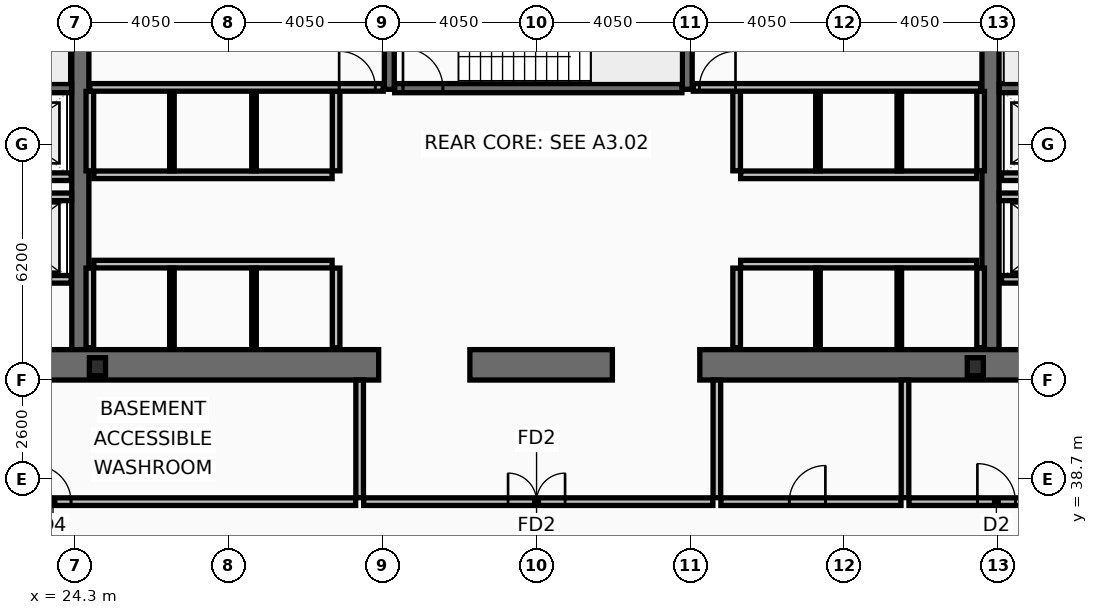
"""IFC4 building model, lengths in metres.
Left out: names, types, materials, properties, quantities, classifications, styles, units other than length and angle.
Written with IfcOpenShell. Run it as: python <this file> out.ifc"""

import sys

from ifc_helpers import new_model, si_unit, direction, frame, frame_2d, origin, origin_2d, place, context, subcontext, project, spatial, rectangle, i_section, extrude, element, fill, save


model = new_model("IFC4")
c1 = context("Model", 3, precision=1e-05, world=origin(), true_north=direction((0.0, 1.0)))
c2 = subcontext(c1, "Body", "Model", "MODEL_VIEW")
j1 = project(units=[si_unit("LENGTHUNIT", "METRE"), si_unit("PLANEANGLEUNIT", "RADIAN")], contexts=[c1])
p1 = place(None, origin())
s1 = spatial("IfcSite", under=j1, at=p1, CompositionType="ELEMENT")
p2 = place(p1, origin())
s2 = spatial("IfcBuilding", under=s1, at=p2, CompositionType="ELEMENT")
p3 = place(p2, frame((0.0, 0.0, -4.5)))
s3 = spatial("IfcBuildingStorey", under=s2, at=p3, CompositionType="ELEMENT", Elevation=-4.5)
for number, where, z_axis, x_axis in (
    (1, (24.45, 42.1, 0.0), (0.0, 0.0, 1.0), (0.0, 1.0, 0.0)),
    (2, (48.4, 42.1, 0.0), (0.0, 0.0, 1.0), (0.0, 1.0, 0.0)),
):
    element("IfcWall", number, at=place(p3, frame(where, z_axis=z_axis, x_axis=x_axis)), inside=s3, PredefinedType="SHEAR", context=c2, shape_type="SweptSolid", body=[
        extrude(rectangle(XDim=10.8, YDim=0.45, at=frame_2d((5.4, 0.0))), origin(), (0.0, 0.0, 1.0), 4.28),
    ])
p4 = place(p3, frame((32.3, 41.7, 0.0), z_axis=(0.0, 0.0, 1.0), x_axis=(-1.0, 0.0, 0.0)))
e3 = element("IfcWall", 3, at=p4, inside=s3, PredefinedType="SHEAR", context=c2, shape_type="SweptSolid", body=[
    extrude(rectangle(XDim=11.45, YDim=0.8, at=frame_2d((5.725, 0.0))), origin(), (0.0, 0.0, 1.0), 4.28),
])
p5 = place(p3, frame((38.45, 41.7, 0.0), z_axis=(0.0, 0.0, 1.0), x_axis=(-1.0, 0.0, 0.0)))
e4 = element("IfcWall", 4, at=p5, inside=s3, PredefinedType="SHEAR", context=c2, shape_type="SweptSolid", body=[
    extrude(rectangle(XDim=3.75, YDim=0.8, at=frame_2d((1.875, 0.0))), origin(), (0.0, 0.0, 1.0), 4.28),
])
p6 = place(p3, frame((52.05, 41.7, 0.0), z_axis=(0.0, 0.0, 1.0), x_axis=(-1.0, 0.0, 0.0)))
e5 = element("IfcWall", 5, at=p6, inside=s3, PredefinedType="SHEAR", context=c2, shape_type="SweptSolid", body=[
    extrude(rectangle(XDim=11.3, YDim=0.8, at=frame_2d((5.65, 0.0))), origin(), (0.0, 0.0, 1.0), 4.28),
])
for number, where, z_axis, x_axis in (
    (6, (32.58, 48.95, 0.0), (0.0, 0.0, 1.0), (0.0, 1.0, 0.0)),
    (7, (40.42, 48.95, 0.0), (0.0, 0.0, 1.0), (0.0, 1.0, 0.0)),
):
    element("IfcWall", number, at=place(p3, frame(where, z_axis=z_axis, x_axis=x_axis)), inside=s3, PredefinedType="SHEAR", context=c2, shape_type="SweptSolid", body=[
        extrude(rectangle(XDim=3.95, YDim=0.26, at=frame_2d((1.975, 0.0))), origin(), (0.0, 0.0, 1.0), 4.28),
    ])
p7 = place(p3, frame((17.0, 48.98, 0.0), z_axis=(0.0, 0.0, 1.0), x_axis=(1.0, 0.0, 0.0)))
e8 = element("IfcWall", 8, at=p7, inside=s3, PredefinedType="SHEAR", context=c2, shape_type="SweptSolid", body=[
    extrude(rectangle(XDim=7.22, YDim=0.24, at=frame_2d((3.61, 0.0))), origin(), (0.0, 0.0, 1.0), 4.28),
])
p8 = place(p7, frame((0.22, 0.0, 0.0)))
e9 = element("IfcOpeningElement", 9, at=p8, cuts=e8, PredefinedType="OPENING", context=c2, shape_type="SweptSolid", body=[
    extrude(rectangle(XDim=1.05, YDim=2.15, at=frame_2d((0.525, 1.075))), frame((0.0, 0.13, 0.0), z_axis=(0.0, -1.0, 0.0), x_axis=(1.0, 0.0, 0.0)), (0.0, 0.0, 1.0), 0.26),
])
p9 = place(p3, frame((48.63, 48.98, 0.0), z_axis=(0.0, 0.0, 1.0), x_axis=(1.0, 0.0, 0.0)))
e10 = element("IfcWall", 10, at=p9, inside=s3, PredefinedType="SHEAR", context=c2, shape_type="SweptSolid", body=[
    extrude(rectangle(XDim=7.27, YDim=0.24, at=frame_2d((3.635, 0.0))), origin(), (0.0, 0.0, 1.0), 4.28),
])
p10 = place(p9, frame((6.0, 0.0, 0.0)))
e11 = element("IfcOpeningElement", 11, at=p10, cuts=e10, PredefinedType="OPENING", context=c2, shape_type="SweptSolid", body=[
    extrude(rectangle(XDim=1.05, YDim=2.15, at=frame_2d((0.525, 1.075))), frame((0.0, 0.13, 0.0), z_axis=(0.0, -1.0, 0.0), x_axis=(1.0, 0.0, 0.0)), (0.0, 0.0, 1.0), 0.26),
])
p11 = place(p3, frame((32.72, 48.98, 0.0), z_axis=(0.0, 0.0, 1.0), x_axis=(1.0, 0.0, 0.0)))
e12 = element("IfcWall", 12, at=p11, inside=s3, PredefinedType="SHEAR", context=c2, shape_type="SweptSolid", body=[
    extrude(rectangle(XDim=7.56, YDim=0.24, at=frame_2d((3.78, 0.0))), origin(), (0.0, 0.0, 1.0), 4.28),
])
p12 = place(p11, frame((0.22, 0.0, 0.0)))
e13 = element("IfcOpeningElement", 13, at=p12, cuts=e12, PredefinedType="OPENING", context=c2, shape_type="SweptSolid", body=[
    extrude(rectangle(XDim=1.05, YDim=2.15, at=frame_2d((0.525, 1.075))), frame((0.0, 0.13, 0.0), z_axis=(0.0, -1.0, 0.0), x_axis=(1.0, 0.0, 0.0)), (0.0, 0.0, 1.0), 0.26),
])
for number, where, z_axis, x_axis in (
    (14, (24.9, 41.65, 0.0), (0.0, 0.0, 1.0), (1.0, 0.0, 0.0)),
    (15, (48.0, 41.65, 0.0), (0.0, 0.0, 1.0), (1.0, 0.0, 0.0)),
):
    element("IfcColumn", number, at=place(p3, frame(where, z_axis=z_axis, x_axis=x_axis)), inside=s3, PredefinedType="COLUMN", context=c2, shape_type="SweptSolid", body=[
        extrude(i_section(OverallWidth=0.424, OverallDepth=0.474, WebThickness=0.048, FlangeThickness=0.077, at=origin_2d()), origin(), (0.0, 0.0, 1.0), 4.5),
    ])
p13 = place(p3, frame((51.61, 43.95, 0.0), z_axis=(0.0, 0.0, 1.0), x_axis=(-1.0, 0.0, 0.0)))
e16 = element("IfcWall", 16, at=p13, inside=s3, PredefinedType="PARTITIONING", context=c2, shape_type="SweptSolid", body=[
    extrude(rectangle(XDim=2.92, YDim=0.2, at=frame_2d((1.46, 0.0))), origin(), (0.0, 0.0, 1.0), 4.28),
])
p14 = place(p13, frame((0.81, 0.0, 0.0)))
e17 = element("IfcOpeningElement", 17, at=p14, cuts=e16, PredefinedType="OPENING", context=c2, shape_type="SweptSolid", body=[
    extrude(rectangle(XDim=1.3, YDim=2.18, at=frame_2d((0.65, 1.09))), frame((0.0, 0.11, 0.0), z_axis=(0.0, -1.0, 0.0), x_axis=(1.0, 0.0, 0.0)), (0.0, 0.0, 1.0), 0.22),
])
p15 = place(p3, frame((24.21, 43.95, 0.0), z_axis=(0.0, 0.0, 1.0), x_axis=(-1.0, 0.0, 0.0)))
e18 = element("IfcWall", 18, at=p15, inside=s3, PredefinedType="PARTITIONING", context=c2, shape_type="SweptSolid", body=[
    extrude(rectangle(XDim=2.97, YDim=0.2, at=frame_2d((1.485, 0.0))), origin(), (0.0, 0.0, 1.0), 4.28),
])
p16 = place(p15, frame((0.86, 0.0, 0.0)))
e19 = element("IfcOpeningElement", 19, at=p16, cuts=e18, PredefinedType="OPENING", context=c2, shape_type="SweptSolid", body=[
    extrude(rectangle(XDim=1.3, YDim=2.18, at=frame_2d((0.65, 1.09))), frame((0.0, 0.11, 0.0), z_axis=(0.0, -1.0, 0.0), x_axis=(1.0, 0.0, 0.0)), (0.0, 0.0, 1.0), 0.22),
])
p17 = place(p3, frame((51.61, 46.65, 0.0), z_axis=(0.0, 0.0, 1.0), x_axis=(-1.0, 0.0, 0.0)))
e20 = element("IfcWall", 20, at=p17, inside=s3, PredefinedType="PARTITIONING", context=c2, shape_type="SweptSolid", body=[
    extrude(rectangle(XDim=2.92, YDim=0.2, at=frame_2d((1.46, 0.0))), origin(), (0.0, 0.0, 1.0), 4.28),
])
p18 = place(p17, frame((0.86, 0.0, 0.0)))
e21 = element("IfcOpeningElement", 21, at=p18, cuts=e20, PredefinedType="OPENING", context=c2, shape_type="SweptSolid", body=[
    extrude(rectangle(XDim=1.2, YDim=2.18, at=frame_2d((0.6, 1.09))), frame((0.0, 0.11, 0.0), z_axis=(0.0, -1.0, 0.0), x_axis=(1.0, 0.0, 0.0)), (0.0, 0.0, 1.0), 0.22),
])
p19 = place(p3, frame((24.21, 46.65, 0.0), z_axis=(0.0, 0.0, 1.0), x_axis=(-1.0, 0.0, 0.0)))
e22 = element("IfcWall", 22, at=p19, inside=s3, PredefinedType="PARTITIONING", context=c2, shape_type="SweptSolid", body=[
    extrude(rectangle(XDim=2.97, YDim=0.2, at=frame_2d((1.485, 0.0))), origin(), (0.0, 0.0, 1.0), 4.28),
])
p20 = place(p19, frame((0.91, 0.0, 0.0)))
e23 = element("IfcOpeningElement", 23, at=p20, cuts=e22, PredefinedType="OPENING", context=c2, shape_type="SweptSolid", body=[
    extrude(rectangle(XDim=1.2, YDim=2.18, at=frame_2d((0.6, 1.09))), frame((0.0, 0.11, 0.0), z_axis=(0.0, -1.0, 0.0), x_axis=(1.0, 0.0, 0.0)), (0.0, 0.0, 1.0), 0.22),
])
p21 = place(p3, frame((21.2, 46.12, 0.0), z_axis=(0.0, 0.0, 1.0), x_axis=(1.0, 0.0, 0.0)))
e24 = element("IfcWall", 24, at=p21, inside=s3, PredefinedType="PARTITIONING", context=c2, shape_type="SweptSolid", body=[
    extrude(rectangle(XDim=3.02, YDim=0.2, at=frame_2d((1.51, 0.0))), origin(), (0.0, 0.0, 1.0), 4.28),
])
p22 = place(p3, frame((48.63, 46.12, 0.0), z_axis=(0.0, 0.0, 1.0), x_axis=(1.0, 0.0, 0.0)))
e25 = element("IfcWall", 25, at=p22, inside=s3, PredefinedType="PARTITIONING", context=c2, shape_type="SweptSolid", body=[
    extrude(rectangle(XDim=3.07, YDim=0.2, at=frame_2d((1.535, 0.0))), origin(), (0.0, 0.0, 1.0), 4.28),
])
p23 = place(p3, frame((24.805, 46.7, 0.0), z_axis=(0.0, 0.0, 1.0), x_axis=(1.0, 0.0, 0.0)))
e26 = element("IfcWall", 26, at=p23, inside=s3, PredefinedType="PARTITIONING", context=c2, shape_type="SweptSolid", body=[
    extrude(rectangle(XDim=6.27, YDim=0.2, at=frame_2d((3.135, 0.0))), origin(), (0.0, 0.0, 1.0), 4.28),
])
for number, where, z_axis, x_axis in (
    (27, (24.7, 46.805, 0.0), (0.0, 0.0, 1.0), (0.0, 1.0, 0.0)),
    (28, (31.18, 46.805, 0.0), (0.0, 0.0, 1.0), (0.0, 1.0, 0.0)),
):
    element("IfcWall", number, at=place(p3, frame(where, z_axis=z_axis, x_axis=x_axis)), inside=s3, PredefinedType="PARTITIONING", context=c2, shape_type="SweptSolid", body=[
        extrude(rectangle(XDim=2.09, YDim=0.2, at=frame_2d((1.045, 0.0))), origin(), (0.0, 0.0, 1.0), 4.28),
    ])
for number, where, z_axis, x_axis in (
    (29, (26.86, 46.805, 0.0), (0.0, 0.0, 1.0), (0.0, 1.0, 0.0)),
    (30, (29.02, 46.805, 0.0), (0.0, 0.0, 1.0), (0.0, 1.0, 0.0)),
):
    element("IfcWall", number, at=place(p3, frame(where, z_axis=z_axis, x_axis=x_axis)), inside=s3, PredefinedType="PARTITIONING", context=c2, shape_type="SweptSolid", body=[
        extrude(rectangle(XDim=2.09, YDim=0.12, at=frame_2d((1.045, 0.0))), origin(), (0.0, 0.0, 1.0), 4.28),
    ])
p24 = place(p3, frame((24.805, 44.35, 0.0), z_axis=(0.0, 0.0, 1.0), x_axis=(1.0, 0.0, 0.0)))
e31 = element("IfcWall", 31, at=p24, inside=s3, PredefinedType="PARTITIONING", context=c2, shape_type="SweptSolid", body=[
    extrude(rectangle(XDim=6.27, YDim=0.2, at=frame_2d((3.135, 0.0))), origin(), (0.0, 0.0, 1.0), 4.28),
])
for number, where, z_axis, x_axis in (
    (32, (24.7, 42.15, 0.0), (0.0, 0.0, 1.0), (0.0, 1.0, 0.0)),
    (33, (31.18, 42.15, 0.0), (0.0, 0.0, 1.0), (0.0, 1.0, 0.0)),
):
    element("IfcWall", number, at=place(p3, frame(where, z_axis=z_axis, x_axis=x_axis)), inside=s3, PredefinedType="PARTITIONING", context=c2, shape_type="SweptSolid", body=[
        extrude(rectangle(XDim=2.095, YDim=0.2, at=frame_2d((1.048, 0.0))), origin(), (0.0, 0.0, 1.0), 4.28),
    ])
for number, where, z_axis, x_axis in (
    (34, (26.86, 42.15, 0.0), (0.0, 0.0, 1.0), (0.0, 1.0, 0.0)),
    (35, (29.02, 42.15, 0.0), (0.0, 0.0, 1.0), (0.0, 1.0, 0.0)),
):
    element("IfcWall", number, at=place(p3, frame(where, z_axis=z_axis, x_axis=x_axis)), inside=s3, PredefinedType="PARTITIONING", context=c2, shape_type="SweptSolid", body=[
        extrude(rectangle(XDim=2.095, YDim=0.12, at=frame_2d((1.048, 0.0))), origin(), (0.0, 0.0, 1.0), 4.28),
    ])
p25 = place(p3, frame((41.825, 46.7, 0.0), z_axis=(0.0, 0.0, 1.0), x_axis=(1.0, 0.0, 0.0)))
e36 = element("IfcWall", 36, at=p25, inside=s3, PredefinedType="PARTITIONING", context=c2, shape_type="SweptSolid", body=[
    extrude(rectangle(XDim=6.21, YDim=0.2, at=frame_2d((3.105, 0.0))), origin(), (0.0, 0.0, 1.0), 4.28),
])
for number, where, z_axis, x_axis in (
    (37, (41.72, 46.805, 0.0), (0.0, 0.0, 1.0), (0.0, 1.0, 0.0)),
    (38, (48.14, 46.805, 0.0), (0.0, 0.0, 1.0), (0.0, 1.0, 0.0)),
):
    element("IfcWall", number, at=place(p3, frame(where, z_axis=z_axis, x_axis=x_axis)), inside=s3, PredefinedType="PARTITIONING", context=c2, shape_type="SweptSolid", body=[
        extrude(rectangle(XDim=2.09, YDim=0.2, at=frame_2d((1.045, 0.0))), origin(), (0.0, 0.0, 1.0), 4.28),
    ])
for number, where, z_axis, x_axis in (
    (39, (43.86, 46.805, 0.0), (0.0, 0.0, 1.0), (0.0, 1.0, 0.0)),
    (40, (46.0, 46.805, 0.0), (0.0, 0.0, 1.0), (0.0, 1.0, 0.0)),
):
    element("IfcWall", number, at=place(p3, frame(where, z_axis=z_axis, x_axis=x_axis)), inside=s3, PredefinedType="PARTITIONING", context=c2, shape_type="SweptSolid", body=[
        extrude(rectangle(XDim=2.09, YDim=0.12, at=frame_2d((1.045, 0.0))), origin(), (0.0, 0.0, 1.0), 4.28),
    ])
p26 = place(p3, frame((41.825, 44.35, 0.0), z_axis=(0.0, 0.0, 1.0), x_axis=(1.0, 0.0, 0.0)))
e41 = element("IfcWall", 41, at=p26, inside=s3, PredefinedType="PARTITIONING", context=c2, shape_type="SweptSolid", body=[
    extrude(rectangle(XDim=6.21, YDim=0.2, at=frame_2d((3.105, 0.0))), origin(), (0.0, 0.0, 1.0), 4.28),
])
for number, where, z_axis, x_axis in (
    (42, (41.72, 42.15, 0.0), (0.0, 0.0, 1.0), (0.0, 1.0, 0.0)),
    (43, (48.14, 42.15, 0.0), (0.0, 0.0, 1.0), (0.0, 1.0, 0.0)),
):
    element("IfcWall", number, at=place(p3, frame(where, z_axis=z_axis, x_axis=x_axis)), inside=s3, PredefinedType="PARTITIONING", context=c2, shape_type="SweptSolid", body=[
        extrude(rectangle(XDim=2.095, YDim=0.2, at=frame_2d((1.048, 0.0))), origin(), (0.0, 0.0, 1.0), 4.28),
    ])
for number, where, z_axis, x_axis in (
    (44, (43.86, 42.15, 0.0), (0.0, 0.0, 1.0), (0.0, 1.0, 0.0)),
    (45, (46.0, 42.15, 0.0), (0.0, 0.0, 1.0), (0.0, 1.0, 0.0)),
):
    element("IfcWall", number, at=place(p3, frame(where, z_axis=z_axis, x_axis=x_axis)), inside=s3, PredefinedType="PARTITIONING", context=c2, shape_type="SweptSolid", body=[
        extrude(rectangle(XDim=2.095, YDim=0.12, at=frame_2d((1.048, 0.0))), origin(), (0.0, 0.0, 1.0), 4.28),
    ])
p27 = place(p3, frame((24.7, 49.0, 0.0), z_axis=(0.0, 0.0, 1.0), x_axis=(1.0, 0.0, 0.0)))
e46 = element("IfcWall", 46, at=p27, inside=s3, PredefinedType="PARTITIONING", context=c2, shape_type="SweptSolid", body=[
    extrude(rectangle(XDim=7.72, YDim=0.2, at=frame_2d((3.86, 0.0))), origin(), (0.0, 0.0, 1.0), 4.28),
])
p28 = place(p27, frame((6.56, 0.0, 0.0)))
e47 = element("IfcOpeningElement", 47, at=p28, cuts=e46, PredefinedType="OPENING", context=c2, shape_type="SweptSolid", body=[
    extrude(rectangle(XDim=0.95, YDim=2.1, at=frame_2d((0.475, 1.05))), frame((0.0, 0.11, 0.0), z_axis=(0.0, -1.0, 0.0), x_axis=(1.0, 0.0, 0.0)), (0.0, 0.0, 1.0), 0.22),
])
p29 = place(p3, frame((40.58, 49.0, 0.0), z_axis=(0.0, 0.0, 1.0), x_axis=(1.0, 0.0, 0.0)))
e48 = element("IfcWall", 48, at=p29, inside=s3, PredefinedType="PARTITIONING", context=c2, shape_type="SweptSolid", body=[
    extrude(rectangle(XDim=7.56, YDim=0.2, at=frame_2d((3.78, 0.0))), origin(), (0.0, 0.0, 1.0), 4.28),
])
p30 = place(p29, frame((0.16, 0.0, 0.0)))
e49 = element("IfcOpeningElement", 49, at=p30, cuts=e48, PredefinedType="OPENING", context=c2, shape_type="SweptSolid", body=[
    extrude(rectangle(XDim=0.95, YDim=2.1, at=frame_2d((0.475, 1.05))), frame((0.0, 0.11, 0.0), z_axis=(0.0, -1.0, 0.0), x_axis=(1.0, 0.0, 0.0)), (0.0, 0.0, 1.0), 0.22),
])
p31 = place(p3, frame((31.905, 38.1, 0.0), z_axis=(0.0, 0.0, 1.0), x_axis=(1.0, 0.0, 0.0)))
e50 = element("IfcWall", 50, at=p31, inside=s3, PredefinedType="PARTITIONING", context=c2, shape_type="SweptSolid", body=[
    extrude(rectangle(XDim=9.19, YDim=0.2, at=frame_2d((4.595, 0.0))), origin(), (0.0, 0.0, 1.0), 4.28),
])
p32 = place(p31, frame((3.8, 0.0, 0.0)))
e51 = element("IfcOpeningElement", 51, at=p32, cuts=e50, PredefinedType="OPENING", context=c2, shape_type="SweptSolid", body=[
    extrude(rectangle(XDim=1.5, YDim=2.15, at=frame_2d((0.75, 1.075))), frame((0.0, 0.11, 0.0), z_axis=(0.0, -1.0, 0.0), x_axis=(1.0, 0.0, 0.0)), (0.0, 0.0, 1.0), 0.22),
])
for number, where, z_axis, x_axis in (
    (52, (31.8, 38.205, 0.0), (0.0, 0.0, 1.0), (0.0, 1.0, 0.0)),
    (53, (41.2, 38.205, 0.0), (0.0, 0.0, 1.0), (0.0, 1.0, 0.0)),
):
    element("IfcWall", number, at=place(p3, frame(where, z_axis=z_axis, x_axis=x_axis)), inside=s3, PredefinedType="PARTITIONING", context=c2, shape_type="SweptSolid", body=[
        extrude(rectangle(XDim=3.095, YDim=0.2, at=frame_2d((1.547, 0.0))), origin(), (0.0, 0.0, 1.0), 4.28),
    ])
p33 = place(p3, frame((21.055, 38.1, 0.0), z_axis=(0.0, 0.0, 1.0), x_axis=(1.0, 0.0, 0.0)))
e54 = element("IfcWall", 54, at=p33, inside=s3, PredefinedType="PARTITIONING", context=c2, shape_type="SweptSolid", body=[
    extrude(rectangle(XDim=10.64, YDim=0.2, at=frame_2d((5.32, 0.0))), origin(), (0.0, 0.0, 1.0), 3.37),
])
p34 = place(p33, frame((2.2, 0.0, 0.0)))
e55 = element("IfcOpeningElement", 55, at=p34, cuts=e54, PredefinedType="OPENING", context=c2, shape_type="SweptSolid", body=[
    extrude(rectangle(XDim=0.95, YDim=2.05, at=frame_2d((0.475, 1.025))), frame((0.0, 0.11, 0.0), z_axis=(0.0, -1.0, 0.0), x_axis=(1.0, 0.0, 0.0)), (0.0, 0.0, 1.0), 0.22),
])
p35 = place(p3, frame((46.15, 38.205, 0.0), z_axis=(0.0, 0.0, 1.0), x_axis=(0.0, 1.0, 0.0)))
e56 = element("IfcWall", 56, at=p35, inside=s3, PredefinedType="PARTITIONING", context=c2, shape_type="SweptSolid", body=[
    extrude(rectangle(XDim=3.095, YDim=0.2, at=frame_2d((1.547, 0.0))), origin(), (0.0, 0.0, 1.0), 4.28),
])
p36 = place(p3, frame((41.305, 38.1, 0.0), z_axis=(0.0, 0.0, 1.0), x_axis=(1.0, 0.0, 0.0)))
e57 = element("IfcWall", 57, at=p36, inside=s3, PredefinedType="PARTITIONING", context=c2, shape_type="SweptSolid", body=[
    extrude(rectangle(XDim=4.74, YDim=0.2, at=frame_2d((2.37, 0.0))), origin(), (0.0, 0.0, 1.0), 3.37),
])
p37 = place(p36, frame((1.8, 0.0, 0.0)))
e58 = element("IfcOpeningElement", 58, at=p37, cuts=e57, PredefinedType="OPENING", context=c2, shape_type="SweptSolid", body=[
    extrude(rectangle(XDim=0.95, YDim=2.05, at=frame_2d((0.475, 1.025))), frame((0.0, 0.11, 0.0), z_axis=(0.0, -1.0, 0.0), x_axis=(1.0, 0.0, 0.0)), (0.0, 0.0, 1.0), 0.22),
])
p38 = place(p3, frame((46.255, 38.1, 0.0), z_axis=(0.0, 0.0, 1.0), x_axis=(1.0, 0.0, 0.0)))
e59 = element("IfcWall", 59, at=p38, inside=s3, PredefinedType="PARTITIONING", context=c2, shape_type="SweptSolid", body=[
    extrude(rectangle(XDim=5.59, YDim=0.2, at=frame_2d((2.795, 0.0))), origin(), (0.0, 0.0, 1.0), 3.37),
])
p39 = place(p38, frame((1.8, 0.0, 0.0)))
e60 = element("IfcOpeningElement", 60, at=p39, cuts=e59, PredefinedType="OPENING", context=c2, shape_type="SweptSolid", body=[
    extrude(rectangle(XDim=1.0, YDim=2.05, at=frame_2d((0.5, 1.025))), frame((0.0, 0.11, 0.0), z_axis=(0.0, -1.0, 0.0), x_axis=(1.0, 0.0, 0.0)), (0.0, 0.0, 1.0), 0.22),
])
p40 = place(p12, origin())
e61 = element("IfcDoor", 61, at=p40, inside=s3, OperationType="SINGLE_SWING_LEFT", PredefinedType="DOOR", context=c2, shape_type="SweptSolid", body=[
    extrude(rectangle(XDim=1.05, YDim=2.15, at=frame_2d((0.525, 1.075))), frame((0.0, 0.025, 0.0), z_axis=(0.0, -1.0, 0.0), x_axis=(1.0, 0.0, 0.0)), (0.0, 0.0, 1.0), 0.05),
])
fill(e13, e61)
p41 = place(p28, origin())
e62 = element("IfcDoor", 62, at=p41, inside=s3, OperationType="SINGLE_SWING_LEFT", PredefinedType="DOOR", context=c2, shape_type="SweptSolid", body=[
    extrude(rectangle(XDim=0.95, YDim=2.1, at=frame_2d((0.475, 1.05))), frame((0.0, 0.025, 0.0), z_axis=(0.0, -1.0, 0.0), x_axis=(1.0, 0.0, 0.0)), (0.0, 0.0, 1.0), 0.05),
])
fill(e47, e62)
p42 = place(p30, origin())
e63 = element("IfcDoor", 63, at=p42, inside=s3, OperationType="SINGLE_SWING_RIGHT", PredefinedType="DOOR", context=c2, shape_type="SweptSolid", body=[
    extrude(rectangle(XDim=0.95, YDim=2.1, at=frame_2d((0.475, 1.05))), frame((0.0, 0.025, 0.0), z_axis=(0.0, -1.0, 0.0), x_axis=(1.0, 0.0, 0.0)), (0.0, 0.0, 1.0), 0.05),
])
fill(e49, e63)
p43 = place(p32, origin())
e64 = element("IfcDoor", 64, at=p43, inside=s3, OperationType="DOUBLE_DOOR_SINGLE_SWING", PredefinedType="DOOR", context=c2, shape_type="SweptSolid", body=[
    extrude(rectangle(XDim=1.5, YDim=2.15, at=frame_2d((0.75, 1.075))), frame((0.0, 0.025, 0.0), z_axis=(0.0, -1.0, 0.0), x_axis=(1.0, 0.0, 0.0)), (0.0, 0.0, 1.0), 0.05),
])
fill(e51, e64)
p44 = place(p34, origin())
e65 = element("IfcDoor", 65, at=p44, inside=s3, OperationType="SINGLE_SWING_LEFT", PredefinedType="DOOR", context=c2, shape_type="SweptSolid", body=[
    extrude(rectangle(XDim=0.95, YDim=2.05, at=frame_2d((0.475, 1.025))), frame((0.0, 0.025, 0.0), z_axis=(0.0, -1.0, 0.0), x_axis=(1.0, 0.0, 0.0)), (0.0, 0.0, 1.0), 0.05),
])
fill(e55, e65)
p45 = place(p37, origin())
e66 = element("IfcDoor", 66, at=p45, inside=s3, OperationType="SINGLE_SWING_RIGHT", PredefinedType="DOOR", context=c2, shape_type="SweptSolid", body=[
    extrude(rectangle(XDim=0.95, YDim=2.05, at=frame_2d((0.475, 1.025))), frame((0.0, 0.025, 0.0), z_axis=(0.0, -1.0, 0.0), x_axis=(1.0, 0.0, 0.0)), (0.0, 0.0, 1.0), 0.05),
])
fill(e58, e66)
p46 = place(p39, origin())
e67 = element("IfcDoor", 67, at=p46, inside=s3, OperationType="SINGLE_SWING_LEFT", PredefinedType="DOOR", context=c2, shape_type="SweptSolid", body=[
    extrude(rectangle(XDim=1.0, YDim=2.05, at=frame_2d((0.5, 1.025))), frame((0.0, 0.025, 0.0), z_axis=(0.0, -1.0, 0.0), x_axis=(1.0, 0.0, 0.0)), (0.0, 0.0, 1.0), 0.05),
])
fill(e60, e67)
save(model, sys.argv[1])
